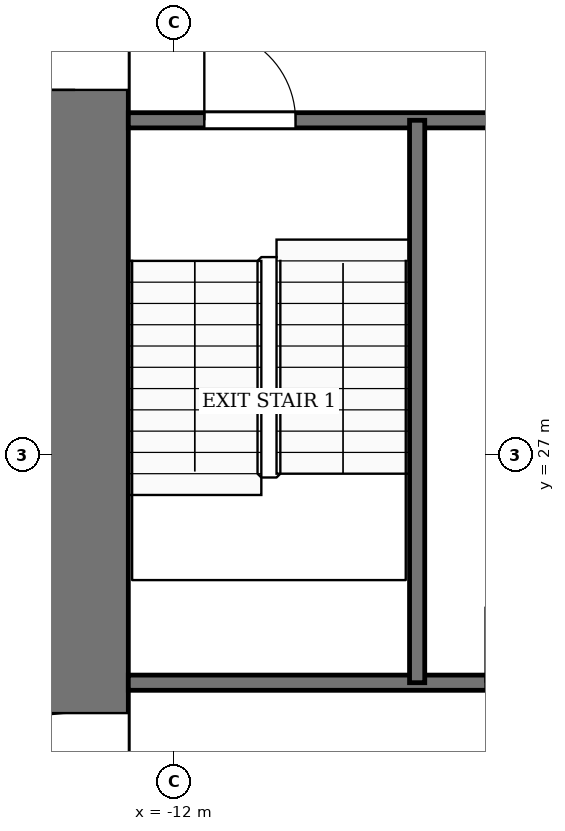
"""IFC4 building model, lengths in metres.
Left out: names, types, materials, properties, quantities, classifications, styles, units other than length and angle.
Written with IfcOpenShell. Run it as: python <this file> out.ifc"""

import sys

from ifc_helpers import new_model, si_unit, direction, frame, frame_2d, origin, place, context, subcontext, project, spatial, rectangle, extrude, element, fill, save


model = new_model("IFC4")
c1 = context("Model", 3, precision=1e-05, world=origin(), true_north=direction((0.0, 1.0)))
c2 = subcontext(c1, "Body", "Model", "MODEL_VIEW")
j1 = project(units=[si_unit("LENGTHUNIT", "METRE"), si_unit("PLANEANGLEUNIT", "RADIAN")], contexts=[c1])
p1 = place(None, origin())
s1 = spatial("IfcSite", under=j1, at=p1, CompositionType="ELEMENT")
p2 = place(p1, origin())
s2 = spatial("IfcBuilding", under=s1, at=p2, CompositionType="ELEMENT")
p3 = place(p2, frame((0.0, 0.0, 14.0)))
s3 = spatial("IfcBuildingStorey", under=s2, at=p3, CompositionType="ELEMENT", Elevation=14.0)
p4 = place(p3, frame((-13.3, 18.4, -0.13), z_axis=(0.0, 0.0, 1.0), x_axis=(0.0, 1.0, 0.0)))
e1 = element("IfcWall", 1, at=p4, inside=s3, PredefinedType="SHEAR", context=c2, shape_type="SweptSolid", body=[
    extrude(rectangle(XDim=19.2, YDim=1.4, at=frame_2d((9.6, 0.0))), origin(), (0.0, 0.0, 1.0), 4.0),
])
p5 = place(p4, frame((2.8, 0.0, 0.13)))
e2 = element("IfcOpeningElement", 2, at=p5, cuts=e1, PredefinedType="OPENING", context=c2, shape_type="SweptSolid", body=[
    extrude(rectangle(XDim=2.4, YDim=2.4, at=frame_2d((1.2, 1.2))), frame((0.0, 0.71, 0.0), z_axis=(0.0, -1.0, 0.0), x_axis=(1.0, 0.0, 0.0)), (0.0, 0.0, 1.0), 1.42),
])
p6 = place(p4, frame((13.4, 0.0, 0.13)))
e3 = element("IfcOpeningElement", 3, at=p6, cuts=e1, PredefinedType="OPENING", context=c2, shape_type="SweptSolid", body=[
    extrude(rectangle(XDim=1.4, YDim=2.2, at=frame_2d((0.7, 1.1))), frame((0.0, 0.71, 0.0), z_axis=(0.0, -1.0, 0.0), x_axis=(1.0, 0.0, 0.0)), (0.0, 0.0, 1.0), 1.42),
])
p7 = place(p3, frame((-12.6, 24.0, 0.0), z_axis=(0.0, 0.0, 1.0), x_axis=(1.0, 0.0, 0.0)))
e4 = element("IfcWall", 4, at=p7, inside=s3, PredefinedType="PARTITIONING", context=c2, shape_type="SweptSolid", body=[
    extrude(rectangle(XDim=6.6, YDim=0.2, at=frame_2d((3.3, 0.0))), origin(), (0.0, 0.0, 1.0), 3.87),
])
p8 = place(p7, frame((4.7, 0.0, 0.0)))
e5 = element("IfcOpeningElement", 5, at=p8, cuts=e4, PredefinedType="OPENING", context=c2, shape_type="SweptSolid", body=[
    extrude(rectangle(XDim=1.0, YDim=2.1, at=frame_2d((0.5, 1.05))), frame((0.0, 0.11, 0.0), z_axis=(0.0, -1.0, 0.0), x_axis=(1.0, 0.0, 0.0)), (0.0, 0.0, 1.0), 0.22),
])
p9 = place(p3, frame((-12.6, 31.4, 0.0), z_axis=(0.0, 0.0, 1.0), x_axis=(1.0, 0.0, 0.0)))
e6 = element("IfcWall", 6, at=p9, inside=s3, PredefinedType="PARTITIONING", context=c2, shape_type="SweptSolid", body=[
    extrude(rectangle(XDim=6.6, YDim=0.2, at=frame_2d((3.3, 0.0))), origin(), (0.0, 0.0, 1.0), 3.87),
])
p10 = place(p9, frame((1.0, 0.0, 0.0)))
e7 = element("IfcOpeningElement", 7, at=p10, cuts=e6, PredefinedType="OPENING", context=c2, shape_type="SweptSolid", body=[
    extrude(rectangle(XDim=1.2, YDim=2.2, at=frame_2d((0.6, 1.1))), frame((0.0, 0.11, 0.0), z_axis=(0.0, -1.0, 0.0), x_axis=(1.0, 0.0, 0.0)), (0.0, 0.0, 1.0), 0.22),
])
p11 = place(p3, frame((-8.8, 24.0, 0.0), z_axis=(0.0, 0.0, 1.0), x_axis=(0.0, 1.0, 0.0)))
e8 = element("IfcWall", 8, at=p11, inside=s3, PredefinedType="PARTITIONING", context=c2, shape_type="SweptSolid", body=[
    extrude(rectangle(XDim=7.4, YDim=0.2, at=frame_2d((3.7, 0.0))), origin(), (0.0, 0.0, 1.0), 3.87),
])
p12 = place(p8, origin())
e9 = element("IfcDoor", 9, at=p12, inside=s3, OperationType="SINGLE_SWING_RIGHT", PredefinedType="DOOR", context=c2, shape_type="SweptSolid", body=[
    extrude(rectangle(XDim=1.0, YDim=2.1, at=frame_2d((0.5, 1.05))), frame((0.0, 0.025, 0.0), z_axis=(0.0, -1.0, 0.0), x_axis=(1.0, 0.0, 0.0)), (0.0, 0.0, 1.0), 0.05),
])
fill(e5, e9)
p13 = place(p10, origin())
e10 = element("IfcDoor", 10, at=p13, inside=s3, OperationType="SINGLE_SWING_RIGHT", PredefinedType="DOOR", context=c2, shape_type="SweptSolid", body=[
    extrude(rectangle(XDim=1.2, YDim=2.2, at=frame_2d((0.6, 1.1))), frame((0.0, 0.025, 0.0), z_axis=(0.0, -1.0, 0.0), x_axis=(1.0, 0.0, 0.0)), (0.0, 0.0, 1.0), 0.05),
])
fill(e7, e10)
p14 = place(p5, origin())
e11 = element("IfcDoor", 11, at=p14, inside=s3, OperationType="DOUBLE_DOOR_SINGLE_SWING", PredefinedType="DOOR", context=c2, shape_type="SweptSolid", body=[
    extrude(rectangle(XDim=2.4, YDim=2.4, at=frame_2d((1.2, 1.2))), frame((0.0, 0.025, 0.0), z_axis=(0.0, -1.0, 0.0), x_axis=(1.0, 0.0, 0.0)), (0.0, 0.0, 1.0), 0.05),
])
fill(e2, e11)
p15 = place(p6, origin())
e12 = element("IfcDoor", 12, at=p15, inside=s3, OperationType="SINGLE_SWING_RIGHT", PredefinedType="DOOR", context=c2, shape_type="SweptSolid", body=[
    extrude(rectangle(XDim=1.4, YDim=2.2, at=frame_2d((0.7, 1.1))), frame((0.0, 0.025, 0.0), z_axis=(0.0, -1.0, 0.0), x_axis=(1.0, 0.0, 0.0)), (0.0, 0.0, 1.0), 0.05),
])
fill(e3, e12)
save(model, sys.argv[1])
